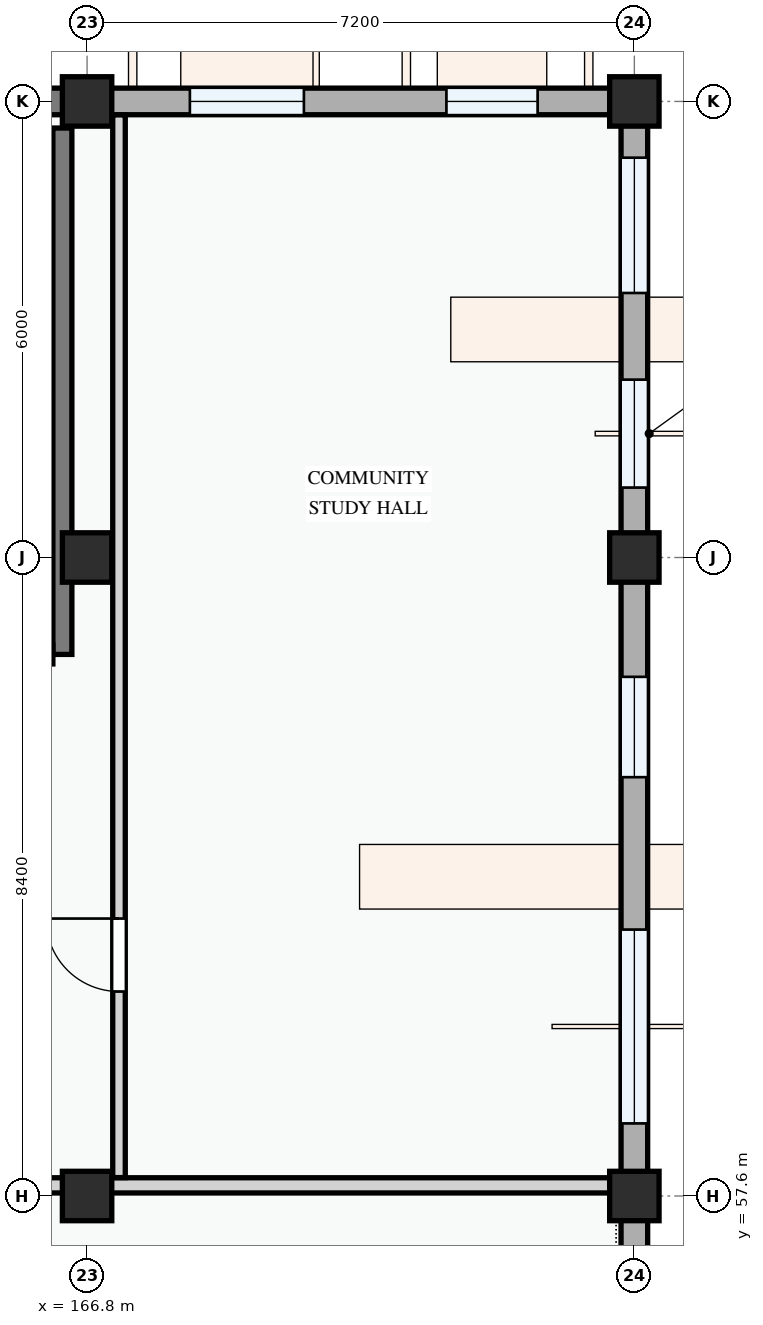
"""IFC4 building model, lengths in metres.
Left out: names, types, materials, properties, quantities, classifications, styles, units other than length and angle.
Written with IfcOpenShell. Run it as: python <this file> out.ifc"""

import sys

from ifc_helpers import new_model, si_unit, direction, frame, frame_2d, origin, origin_2d, place, context, subcontext, project, spatial, rectangle, extrude, element, fill, save


model = new_model("IFC4")
c1 = context("Model", 3, precision=1e-05, world=origin(), true_north=direction((0.0, 1.0)))
c2 = subcontext(c1, "Body", "Model", "MODEL_VIEW")
j1 = project(units=[si_unit("LENGTHUNIT", "METRE"), si_unit("PLANEANGLEUNIT", "RADIAN")], contexts=[c1])
p1 = place(None, origin())
s1 = spatial("IfcSite", under=j1, at=p1, CompositionType="ELEMENT")
p2 = place(p1, origin())
s2 = spatial("IfcBuilding", under=s1, at=p2, CompositionType="ELEMENT")
p3 = place(p2, frame((0.0, 0.0, 4.5)))
s3 = spatial("IfcBuildingStorey", under=s2, at=p3, CompositionType="ELEMENT", Elevation=4.5)
for number, where, z_axis, x_axis in (
    (1, (166.8, 57.6, 0.0), (0.0, 0.0, 1.0), (1.0, 0.0, 0.0)),
    (2, (166.8, 66.0, 0.0), (0.0, 0.0, 1.0), (1.0, 0.0, 0.0)),
    (3, (166.8, 72.0, 0.0), (0.0, 0.0, 1.0), (1.0, 0.0, 0.0)),
    (4, (174.0, 57.6, 0.0), (0.0, 0.0, 1.0), (1.0, 0.0, 0.0)),
    (5, (174.0, 66.0, 0.0), (0.0, 0.0, 1.0), (1.0, 0.0, 0.0)),
    (6, (174.0, 72.0, 0.0), (0.0, 0.0, 1.0), (1.0, 0.0, 0.0)),
):
    element("IfcColumn", number, at=place(p3, frame(where, z_axis=z_axis, x_axis=x_axis)), inside=s3, PredefinedType="COLUMN", context=c2, shape_type="SweptSolid", body=[
        extrude(rectangle(XDim=0.65, YDim=0.65, at=origin_2d()), origin(), (0.0, 0.0, 1.0), 3.6),
    ])
p4 = place(p3, frame((174.0, 51.6, 0.0), z_axis=(0.0, 0.0, 1.0), x_axis=(0.0, 1.0, 0.0)))
e7 = element("IfcWall", 7, at=p4, inside=s3, PredefinedType="STANDARD", context=c2, shape_type="SweptSolid", body=[
    extrude(rectangle(XDim=6.0, YDim=0.35, at=frame_2d((3.0, 0.0))), origin(), (0.0, 0.0, 1.0), 2.875),
])
p5 = place(p4, frame((0.97, 0.0, 0.78)))
e8 = element("IfcOpeningElement", 8, at=p5, cuts=e7, PredefinedType="OPENING", context=c2, shape_type="SweptSolid", body=[
    extrude(rectangle(XDim=1.32, YDim=1.35, at=frame_2d((0.66, 0.675))), frame((0.0, 0.185, 0.0), z_axis=(0.0, -1.0, 0.0), x_axis=(1.0, 0.0, 0.0)), (0.0, 0.0, 1.0), 0.37),
])
p6 = place(p4, frame((3.53, 0.0, 0.78)))
e9 = element("IfcOpeningElement", 9, at=p6, cuts=e7, PredefinedType="OPENING", context=c2, shape_type="SweptSolid", body=[
    extrude(rectangle(XDim=1.68, YDim=1.46, at=frame_2d((0.84, 0.73))), frame((0.0, 0.185, 0.0), z_axis=(0.0, -1.0, 0.0), x_axis=(1.0, 0.0, 0.0)), (0.0, 0.0, 1.0), 0.37),
])
p7 = place(p3, frame((174.0, 57.6, 0.0), z_axis=(0.0, 0.0, 1.0), x_axis=(0.0, 1.0, 0.0)))
e10 = element("IfcWall", 10, at=p7, inside=s3, PredefinedType="STANDARD", context=c2, shape_type="SweptSolid", body=[
    extrude(rectangle(XDim=8.4, YDim=0.35, at=frame_2d((4.2, 0.0))), origin(), (0.0, 0.0, 1.0), 2.725),
])
p8 = place(p7, frame((0.955, 0.0, 0.78)))
e11 = element("IfcOpeningElement", 11, at=p8, cuts=e10, PredefinedType="OPENING", context=c2, shape_type="SweptSolid", body=[
    extrude(rectangle(XDim=2.55, YDim=1.8, at=frame_2d((1.275, 0.9))), frame((0.0, 0.185, 0.0), z_axis=(0.0, -1.0, 0.0), x_axis=(1.0, 0.0, 0.0)), (0.0, 0.0, 1.0), 0.37),
])
p9 = place(p7, frame((5.51, 0.0, 0.78)))
e12 = element("IfcOpeningElement", 12, at=p9, cuts=e10, PredefinedType="OPENING", context=c2, shape_type="SweptSolid", body=[
    extrude(rectangle(XDim=1.32, YDim=1.35, at=frame_2d((0.66, 0.675))), frame((0.0, 0.185, 0.0), z_axis=(0.0, -1.0, 0.0), x_axis=(1.0, 0.0, 0.0)), (0.0, 0.0, 1.0), 0.37),
])
p10 = place(p3, frame((174.0, 66.0, 0.0), z_axis=(0.0, 0.0, 1.0), x_axis=(0.0, 1.0, 0.0)))
e13 = element("IfcWall", 13, at=p10, inside=s3, PredefinedType="STANDARD", context=c2, shape_type="SweptSolid", body=[
    extrude(rectangle(XDim=6.0, YDim=0.35, at=frame_2d((3.0, 0.0))), origin(), (0.0, 0.0, 1.0), 2.875),
])
p11 = place(p10, frame((0.92, 0.0, 0.78)))
e14 = element("IfcOpeningElement", 14, at=p11, cuts=e13, PredefinedType="OPENING", context=c2, shape_type="SweptSolid", body=[
    extrude(rectangle(XDim=1.42, YDim=1.38, at=frame_2d((0.71, 0.69))), frame((0.0, 0.185, 0.0), z_axis=(0.0, -1.0, 0.0), x_axis=(1.0, 0.0, 0.0)), (0.0, 0.0, 1.0), 0.37),
])
p12 = place(p10, frame((3.48, 0.0, 0.78)))
e15 = element("IfcOpeningElement", 15, at=p12, cuts=e13, PredefinedType="OPENING", context=c2, shape_type="SweptSolid", body=[
    extrude(rectangle(XDim=1.78, YDim=1.42, at=frame_2d((0.89, 0.71))), frame((0.0, 0.185, 0.0), z_axis=(0.0, -1.0, 0.0), x_axis=(1.0, 0.0, 0.0)), (0.0, 0.0, 1.0), 0.37),
])
p13 = place(p3, frame((174.0, 72.0, 0.0), z_axis=(0.0, 0.0, 1.0), x_axis=(-1.0, 0.0, 0.0)))
e16 = element("IfcWall", 16, at=p13, inside=s3, PredefinedType="STANDARD", context=c2, shape_type="SweptSolid", body=[
    extrude(rectangle(XDim=7.2, YDim=0.35, at=frame_2d((3.6, 0.0))), origin(), (0.0, 0.0, 1.0), 2.675),
])
p14 = place(p13, frame((1.272, 0.0, 0.78)))
e17 = element("IfcOpeningElement", 17, at=p14, cuts=e16, PredefinedType="OPENING", context=c2, shape_type="SweptSolid", body=[
    extrude(rectangle(XDim=1.2, YDim=1.35, at=frame_2d((0.6, 0.675))), frame((0.0, 0.185, 0.0), z_axis=(0.0, -1.0, 0.0), x_axis=(1.0, 0.0, 0.0)), (0.0, 0.0, 1.0), 0.37),
])
p15 = place(p13, frame((4.347, 0.0, 0.78)))
e18 = element("IfcOpeningElement", 18, at=p15, cuts=e16, PredefinedType="OPENING", context=c2, shape_type="SweptSolid", body=[
    extrude(rectangle(XDim=1.5, YDim=1.65, at=frame_2d((0.75, 0.825))), frame((0.0, 0.185, 0.0), z_axis=(0.0, -1.0, 0.0), x_axis=(1.0, 0.0, 0.0)), (0.0, 0.0, 1.0), 0.37),
])
p16 = place(p3, frame((166.8, 72.0, 0.0), z_axis=(0.0, 0.0, 1.0), x_axis=(-1.0, 0.0, 0.0)))
e19 = element("IfcWall", 19, at=p16, inside=s3, PredefinedType="STANDARD", context=c2, shape_type="SweptSolid", body=[
    extrude(rectangle(XDim=0.65, YDim=0.35, at=frame_2d((0.325, 0.0))), origin(), (0.0, 0.0, 1.0), 3.34),
])
p17 = place(p3, frame((166.475, 71.65, 0.0), z_axis=(0.0, 0.0, 1.0), x_axis=(0.0, -1.0, 0.0)))
e20 = element("IfcWall", 20, at=p17, inside=s3, PredefinedType="SHEAR", context=c2, shape_type="SweptSolid", body=[
    extrude(rectangle(XDim=6.925, YDim=0.25, at=frame_2d((3.462, 0.0))), origin(), (0.0, 0.0, 1.0), 3.3),
])
p18 = place(p3, frame((162.057, 57.74, 0.0), z_axis=(0.0, 0.0, 1.0), x_axis=(1.0, 0.0, 0.0)))
e21 = element("IfcWall", 21, at=p18, inside=s3, PredefinedType="PARTITIONING", context=c2, shape_type="SweptSolid", body=[
    extrude(rectangle(XDim=11.766, YDim=0.2, at=frame_2d((5.883, 0.0))), origin(), (0.0, 0.0, 1.0), 2.675),
])
p19 = place(p3, frame((167.22, 57.842, 0.0), z_axis=(0.0, 0.0, 1.0), x_axis=(0.0, 1.0, 0.0)))
e22 = element("IfcWall", 22, at=p19, inside=s3, PredefinedType="PARTITIONING", context=c2, shape_type="SweptSolid", body=[
    extrude(rectangle(XDim=13.981, YDim=0.165, at=frame_2d((6.99, 0.0))), origin(), (0.0, 0.0, 1.0), 2.725),
])
p20 = place(p19, frame((2.448, 0.0, 0.0)))
e23 = element("IfcOpeningElement", 23, at=p20, cuts=e22, PredefinedType="OPENING", context=c2, shape_type="SweptSolid", body=[
    extrude(rectangle(XDim=0.96, YDim=2.12, at=frame_2d((0.48, 1.06))), frame((0.0, 0.093, 0.0), z_axis=(0.0, -1.0, 0.0), x_axis=(1.0, 0.0, 0.0)), (0.0, 0.0, 1.0), 0.185),
])
p21 = place(p8, origin())
e24 = element("IfcWindow", 24, at=p21, inside=s3, PartitioningType="DOUBLE_PANEL_VERTICAL", PredefinedType="WINDOW", context=c2, shape_type="SweptSolid", body=[
    extrude(rectangle(XDim=2.55, YDim=1.8, at=frame_2d((1.275, 0.9))), frame((0.0, 0.03, 0.0), z_axis=(0.0, -1.0, 0.0), x_axis=(1.0, 0.0, 0.0)), (0.0, 0.0, 1.0), 0.06),
])
fill(e11, e24)
p22 = place(p9, origin())
e25 = element("IfcWindow", 25, at=p22, inside=s3, PartitioningType="SINGLE_PANEL", PredefinedType="WINDOW", context=c2, shape_type="SweptSolid", body=[
    extrude(rectangle(XDim=1.32, YDim=1.35, at=frame_2d((0.66, 0.675))), frame((0.0, 0.03, 0.0), z_axis=(0.0, -1.0, 0.0), x_axis=(1.0, 0.0, 0.0)), (0.0, 0.0, 1.0), 0.06),
])
fill(e12, e25)
p23 = place(p11, origin())
e26 = element("IfcWindow", 26, at=p23, inside=s3, PartitioningType="SINGLE_PANEL", PredefinedType="WINDOW", context=c2, shape_type="SweptSolid", body=[
    extrude(rectangle(XDim=1.42, YDim=1.38, at=frame_2d((0.71, 0.69))), frame((0.0, 0.03, 0.0), z_axis=(0.0, -1.0, 0.0), x_axis=(1.0, 0.0, 0.0)), (0.0, 0.0, 1.0), 0.06),
])
fill(e14, e26)
p24 = place(p12, origin())
e27 = element("IfcWindow", 27, at=p24, inside=s3, PartitioningType="DOUBLE_PANEL_VERTICAL", PredefinedType="WINDOW", context=c2, shape_type="SweptSolid", body=[
    extrude(rectangle(XDim=1.78, YDim=1.42, at=frame_2d((0.89, 0.71))), frame((0.0, 0.03, 0.0), z_axis=(0.0, -1.0, 0.0), x_axis=(1.0, 0.0, 0.0)), (0.0, 0.0, 1.0), 0.06),
])
fill(e15, e27)
p25 = place(p14, origin())
e28 = element("IfcWindow", 28, at=p25, inside=s3, PartitioningType="SINGLE_PANEL", PredefinedType="WINDOW", context=c2, shape_type="SweptSolid", body=[
    extrude(rectangle(XDim=1.2, YDim=1.35, at=frame_2d((0.6, 0.675))), frame((0.0, 0.03, 0.0), z_axis=(0.0, -1.0, 0.0), x_axis=(1.0, 0.0, 0.0)), (0.0, 0.0, 1.0), 0.06),
])
fill(e17, e28)
p26 = place(p15, origin())
e29 = element("IfcWindow", 29, at=p26, inside=s3, PartitioningType="SINGLE_PANEL", PredefinedType="WINDOW", context=c2, shape_type="SweptSolid", body=[
    extrude(rectangle(XDim=1.5, YDim=1.65, at=frame_2d((0.75, 0.825))), frame((0.0, 0.03, 0.0), z_axis=(0.0, -1.0, 0.0), x_axis=(1.0, 0.0, 0.0)), (0.0, 0.0, 1.0), 0.06),
])
fill(e18, e29)
p27 = place(p20, origin())
e30 = element("IfcDoor", 30, at=p27, inside=s3, OperationType="SINGLE_SWING_RIGHT", PredefinedType="DOOR", context=c2, shape_type="SweptSolid", body=[
    extrude(rectangle(XDim=0.96, YDim=2.12, at=frame_2d((0.48, 1.06))), frame((0.0, 0.025, 0.0), z_axis=(0.0, -1.0, 0.0), x_axis=(1.0, 0.0, 0.0)), (0.0, 0.0, 1.0), 0.05),
])
fill(e23, e30)
save(model, sys.argv[1])
